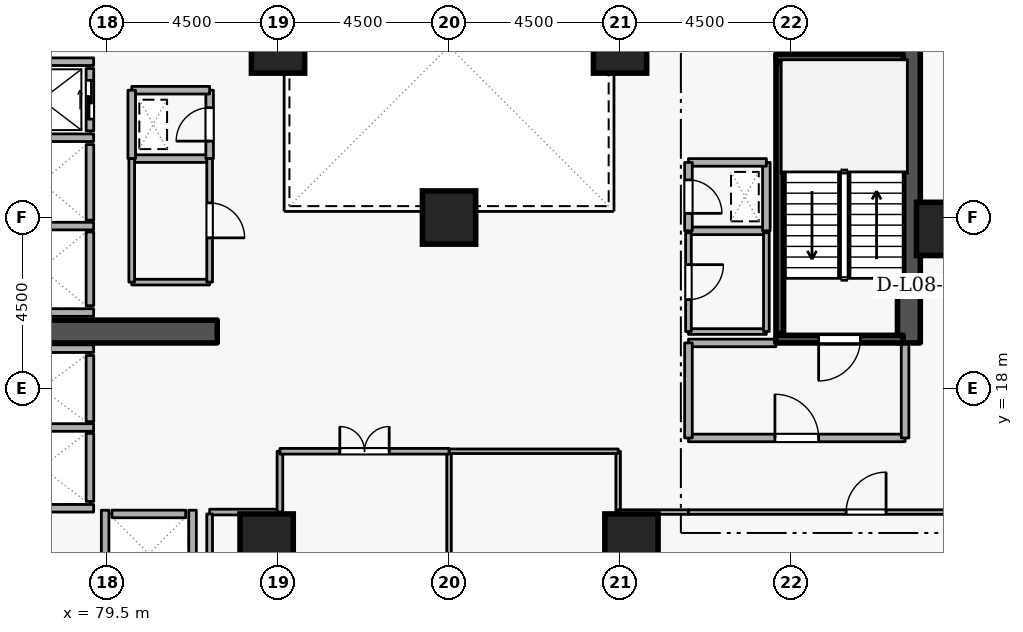
"""IFC4 building model, lengths in metres.
Left out: names, types, materials, properties, quantities, classifications, styles, units other than length and angle.
Written with IfcOpenShell. Run it as: python <this file> out.ifc"""

import sys

from ifc_helpers import new_model, si_unit, direction, frame, frame_2d, origin, origin_2d, place, context, subcontext, project, spatial, rectangle, extrude, element, fill, save


model = new_model("IFC4")
c1 = context("Model", 3, precision=1e-05, world=origin(), true_north=direction((0.0, 1.0)))
c2 = subcontext(c1, "Body", "Model", "MODEL_VIEW")
j1 = project(units=[si_unit("LENGTHUNIT", "METRE"), si_unit("PLANEANGLEUNIT", "RADIAN")], contexts=[c1])
p1 = place(None, origin())
s1 = spatial("IfcSite", under=j1, at=p1, CompositionType="ELEMENT")
p2 = place(p1, origin())
s2 = spatial("IfcBuilding", under=s1, at=p2, CompositionType="ELEMENT")
p3 = place(p2, frame((0.0, 0.0, 35.1)))
s3 = spatial("IfcBuildingStorey", under=s2, at=p3, CompositionType="ELEMENT", Elevation=35.1)
p4 = place(p3, frame((100.6, 19.2, 0.0), z_axis=(0.0, 0.0, 1.0), x_axis=(0.0, 1.0, 0.0)))
e1 = element("IfcWall", 1, at=p4, inside=s3, PredefinedType="SHEAR", context=c2, shape_type="SweptSolid", body=[
    extrude(rectangle(XDim=15.6, YDim=0.6, at=frame_2d((7.8, 0.0))), origin(), (0.0, 0.0, 1.0), 3.6),
])
p5 = place(p3, frame((76.7, 19.5, 0.0), z_axis=(0.0, 0.0, 1.0), x_axis=(1.0, 0.0, 0.0)))
e2 = element("IfcWall", 2, at=p5, inside=s3, PredefinedType="SHEAR", context=c2, shape_type="SweptSolid", body=[
    extrude(rectangle(XDim=5.7, YDim=0.6, at=frame_2d((2.85, 0.0))), origin(), (0.0, 0.0, 1.0), 3.6),
])
for number, where, z_axis, x_axis in (
    (3, (93.3, 14.0, 0.0), (0.0, 0.0, 1.0), (1.0, 0.0, 0.0)),
    (4, (83.7, 14.0, 0.0), (0.0, 0.0, 1.0), (1.0, 0.0, 0.0)),
    (5, (101.5, 22.2, 0.0), (0.0, 0.0, 1.0), (1.0, 0.0, 0.0)),
    (6, (93.0, 27.0, 0.0), (0.0, 0.0, 1.0), (1.0, 0.0, 0.0)),
    (7, (84.0, 27.0, 0.0), (0.0, 0.0, 1.0), (1.0, 0.0, 0.0)),
    (8, (88.5, 22.5, 0.0), (0.0, 0.0, 1.0), (1.0, 0.0, 0.0)),
):
    element("IfcColumn", number, at=place(p3, frame(where, z_axis=z_axis, x_axis=x_axis)), inside=s3, PredefinedType="COLUMN", context=c2, shape_type="SweptSolid", body=[
        extrude(rectangle(XDim=1.4, YDim=1.4, at=origin_2d()), origin(), (0.0, 0.0, 1.0), 3.6),
    ])
p6 = place(p3, frame((79.05, 24.78, 0.0), z_axis=(0.0, 0.0, 1.0), x_axis=(0.0, 1.0, 0.0)))
e9 = element("IfcWall", 9, at=p6, inside=s3, PredefinedType="STANDARD", context=c2, shape_type="SweptSolid", body=[
    extrude(rectangle(XDim=1.64, YDim=0.2, at=frame_2d((0.82, 0.0))), origin(), (0.0, 0.0, 1.0), 3.34),
])
p7 = place(p6, frame((0.31, 0.0, 0.0)))
e10 = element("IfcOpeningElement", 10, at=p7, cuts=e9, PredefinedType="OPENING", context=c2, shape_type="SweptSolid", body=[
    extrude(rectangle(XDim=1.02, YDim=2.06, at=frame_2d((0.51, 1.03))), frame((0.0, 0.11, 0.0), z_axis=(0.0, -1.0, 0.0), x_axis=(1.0, 0.0, 0.0)), (0.0, 0.0, 1.0), 0.22),
])
p8 = place(p3, frame((79.05, 22.43, 0.0), z_axis=(0.0, 0.0, 1.0), x_axis=(0.0, 1.0, 0.0)))
e11 = element("IfcWall", 11, at=p8, inside=s3, PredefinedType="STANDARD", context=c2, shape_type="SweptSolid", body=[
    extrude(rectangle(XDim=1.99, YDim=0.2, at=frame_2d((0.995, 0.0))), origin(), (0.0, 0.0, 1.0), 3.34),
])
p9 = place(p3, frame((79.05, 20.18, 0.0), z_axis=(0.0, 0.0, 1.0), x_axis=(0.0, 1.0, 0.0)))
e12 = element("IfcWall", 12, at=p9, inside=s3, PredefinedType="STANDARD", context=c2, shape_type="SweptSolid", body=[
    extrude(rectangle(XDim=1.94, YDim=0.2, at=frame_2d((0.97, 0.0))), origin(), (0.0, 0.0, 1.0), 3.34),
])
p10 = place(p3, frame((79.05, 17.13, 0.0), z_axis=(0.0, 0.0, 1.0), x_axis=(0.0, 1.0, 0.0)))
e13 = element("IfcWall", 13, at=p10, inside=s3, PredefinedType="STANDARD", context=c2, shape_type="SweptSolid", body=[
    extrude(rectangle(XDim=1.74, YDim=0.2, at=frame_2d((0.87, 0.0))), origin(), (0.0, 0.0, 1.0), 3.34),
])
p11 = place(p3, frame((79.05, 15.03, 0.0), z_axis=(0.0, 0.0, 1.0), x_axis=(0.0, 1.0, 0.0)))
e14 = element("IfcWall", 14, at=p11, inside=s3, PredefinedType="STANDARD", context=c2, shape_type="SweptSolid", body=[
    extrude(rectangle(XDim=1.79, YDim=0.2, at=frame_2d((0.895, 0.0))), origin(), (0.0, 0.0, 1.0), 3.34),
])
p12 = place(p3, frame((79.63, 14.7, 0.0), z_axis=(0.0, 0.0, 1.0), x_axis=(1.0, 0.0, 0.0)))
e15 = element("IfcWall", 15, at=p12, inside=s3, PredefinedType="STANDARD", context=c2, shape_type="SweptSolid", body=[
    extrude(rectangle(XDim=1.94, YDim=0.2, at=frame_2d((0.97, 0.0))), origin(), (0.0, 0.0, 1.0), 3.34),
])
for number, where, z_axis, x_axis in (
    (16, (76.712, 26.6, 0.0), (0.0, 0.0, 1.0), (1.0, 0.0, 0.0)),
    (17, (76.712, 24.6, 0.0), (0.0, 0.0, 1.0), (1.0, 0.0, 0.0)),
    (18, (76.712, 22.275, 0.0), (0.0, 0.0, 1.0), (1.0, 0.0, 0.0)),
    (19, (76.712, 20.0, 0.0), (0.0, 0.0, 1.0), (1.0, 0.0, 0.0)),
):
    element("IfcWall", number, at=place(p3, frame(where, z_axis=z_axis, x_axis=x_axis)), inside=s3, PredefinedType="STANDARD", context=c2, shape_type="SweptSolid", body=[
        extrude(rectangle(XDim=2.436, YDim=0.2, at=frame_2d((1.218, 0.0))), origin(), (0.0, 0.0, 1.0), 3.34),
    ])
p13 = place(p3, frame((76.402, 19.05, 0.0), z_axis=(0.0, 0.0, 1.0), x_axis=(1.0, 0.0, 0.0)))
e20 = element("IfcWall", 20, at=p13, inside=s3, PredefinedType="STANDARD", context=c2, shape_type="SweptSolid", body=[
    extrude(rectangle(XDim=2.746, YDim=0.2, at=frame_2d((1.373, 0.0))), origin(), (0.0, 0.0, 1.0), 2.545),
])
p14 = place(p3, frame((76.402, 16.975, 0.0), z_axis=(0.0, 0.0, 1.0), x_axis=(1.0, 0.0, 0.0)))
e21 = element("IfcWall", 21, at=p14, inside=s3, PredefinedType="STANDARD", context=c2, shape_type="SweptSolid", body=[
    extrude(rectangle(XDim=2.746, YDim=0.2, at=frame_2d((1.373, 0.0))), origin(), (0.0, 0.0, 1.0), 3.34),
])
p15 = place(p3, frame((76.512, 14.85, 0.0), z_axis=(0.0, 0.0, 1.0), x_axis=(1.0, 0.0, 0.0)))
e22 = element("IfcWall", 22, at=p15, inside=s3, PredefinedType="STANDARD", context=c2, shape_type="SweptSolid", body=[
    extrude(rectangle(XDim=2.636, YDim=0.2, at=frame_2d((1.318, 0.0))), origin(), (0.0, 0.0, 1.0), 3.34),
])
for number, where, z_axis, x_axis in (
    (23, (81.75, 12.612, 0.0), (0.0, 0.0, 1.0), (0.0, 1.0, 0.0)),
    (24, (79.45, 12.612, 0.0), (0.0, 0.0, 1.0), (0.0, 1.0, 0.0)),
):
    element("IfcWall", number, at=place(p3, frame(where, z_axis=z_axis, x_axis=x_axis)), inside=s3, PredefinedType="STANDARD", context=c2, shape_type="SweptSolid", body=[
        extrude(rectangle(XDim=2.186, YDim=0.2, at=frame_2d((1.093, 0.0))), origin(), (0.0, 0.0, 1.0), 3.34),
    ])
p16 = place(p3, frame((100.45, 19.3, 0.0), z_axis=(0.0, 0.0, 1.0), x_axis=(-1.0, 0.0, 0.0)))
e25 = element("IfcWall", 25, at=p16, inside=s3, PredefinedType="SHEAR", context=c2, shape_type="SweptSolid", body=[
    extrude(rectangle(XDim=3.35, YDim=0.2, at=frame_2d((1.675, 0.0))), origin(), (0.0, 0.0, 1.0), 3.6),
])
p17 = place(p16, frame((1.125, 0.0, 0.0)))
e26 = element("IfcOpeningElement", 26, at=p17, cuts=e25, PredefinedType="OPENING", context=c2, shape_type="SweptSolid", body=[
    extrude(rectangle(XDim=1.1, YDim=2.1, at=frame_2d((0.55, 1.05))), frame((0.0, 0.11, 0.0), z_axis=(0.0, -1.0, 0.0), x_axis=(1.0, 0.0, 0.0)), (0.0, 0.0, 1.0), 0.22),
])
p18 = place(p3, frame((97.1, 26.7, 0.0), z_axis=(0.0, 0.0, 1.0), x_axis=(1.0, 0.0, 0.0)))
e27 = element("IfcWall", 27, at=p18, inside=s3, PredefinedType="SHEAR", context=c2, shape_type="SweptSolid", body=[
    extrude(rectangle(XDim=3.35, YDim=0.2, at=frame_2d((1.675, 0.0))), origin(), (0.0, 0.0, 1.0), 3.6),
])
p19 = place(p3, frame((97.203, 26.55, 0.0), z_axis=(0.0, 0.0, 1.0), x_axis=(0.0, -1.0, 0.0)))
e28 = element("IfcWall", 28, at=p19, inside=s3, PredefinedType="SHEAR", context=c2, shape_type="SweptSolid", body=[
    extrude(rectangle(XDim=7.1, YDim=0.2, at=frame_2d((3.55, 0.0))), origin(), (0.0, 0.0, 1.0), 3.6),
])
p20 = place(p3, frame((94.8, 16.7, 0.0), z_axis=(0.0, 0.0, 1.0), x_axis=(1.0, 0.0, 0.0)))
e29 = element("IfcWall", 29, at=p20, inside=s3, PredefinedType="STANDARD", context=c2, shape_type="SweptSolid", body=[
    extrude(rectangle(XDim=5.7, YDim=0.2, at=frame_2d((2.85, 0.0))), origin(), (0.0, 0.0, 1.0), 3.34),
])
p21 = place(p20, frame((2.275, 0.0, 0.0)))
e30 = element("IfcOpeningElement", 30, at=p21, cuts=e29, PredefinedType="OPENING", context=c2, shape_type="SweptSolid", body=[
    extrude(rectangle(XDim=1.15, YDim=2.1, at=frame_2d((0.575, 1.05))), frame((0.0, 0.11, 0.0), z_axis=(0.0, -1.0, 0.0), x_axis=(1.0, 0.0, 0.0)), (0.0, 0.0, 1.0), 0.22),
])
p22 = place(p3, frame((100.5, 16.7, 0.0), z_axis=(0.0, 0.0, 1.0), x_axis=(0.0, 1.0, 0.0)))
e31 = element("IfcWall", 31, at=p22, inside=s3, PredefinedType="STANDARD", context=c2, shape_type="SweptSolid", body=[
    extrude(rectangle(XDim=2.5, YDim=0.2, at=frame_2d((1.25, 0.0))), origin(), (0.0, 0.0, 1.0), 3.34),
])
p23 = place(p3, frame((97.1, 19.2, 0.0), z_axis=(0.0, 0.0, 1.0), x_axis=(-1.0, 0.0, 0.0)))
e32 = element("IfcWall", 32, at=p23, inside=s3, PredefinedType="STANDARD", context=c2, shape_type="SweptSolid", body=[
    extrude(rectangle(XDim=2.3, YDim=0.2, at=frame_2d((1.15, 0.0))), origin(), (0.0, 0.0, 1.0), 2.545),
])
p24 = place(p3, frame((94.8, 19.2, 0.0), z_axis=(0.0, 0.0, 1.0), x_axis=(0.0, -1.0, 0.0)))
e33 = element("IfcWall", 33, at=p24, inside=s3, PredefinedType="STANDARD", context=c2, shape_type="SweptSolid", body=[
    extrude(rectangle(XDim=2.5, YDim=0.2, at=frame_2d((1.25, 0.0))), origin(), (0.0, 0.0, 1.0), 3.34),
])
p25 = place(p3, frame((94.8, 22.15, 0.0), z_axis=(0.0, 0.0, 1.0), x_axis=(1.0, 0.0, 0.0)))
e34 = element("IfcWall", 34, at=p25, inside=s3, PredefinedType="STANDARD", context=c2, shape_type="SweptSolid", body=[
    extrude(rectangle(XDim=2.05, YDim=0.2, at=frame_2d((1.025, 0.0))), origin(), (0.0, 0.0, 1.0), 3.34),
])
p26 = place(p3, frame((96.85, 22.15, 0.0), z_axis=(0.0, 0.0, 1.0), x_axis=(0.0, 1.0, 0.0)))
e35 = element("IfcWall", 35, at=p26, inside=s3, PredefinedType="STANDARD", context=c2, shape_type="SweptSolid", body=[
    extrude(rectangle(XDim=1.8, YDim=0.2, at=frame_2d((0.9, 0.0))), origin(), (0.0, 0.0, 1.0), 3.34),
])
p27 = place(p3, frame((96.85, 23.95, 0.0), z_axis=(0.0, 0.0, 1.0), x_axis=(-1.0, 0.0, 0.0)))
e36 = element("IfcWall", 36, at=p27, inside=s3, PredefinedType="STANDARD", context=c2, shape_type="SweptSolid", body=[
    extrude(rectangle(XDim=2.05, YDim=0.2, at=frame_2d((1.025, 0.0))), origin(), (0.0, 0.0, 1.0), 3.34),
])
p28 = place(p3, frame((94.8, 23.95, 0.0), z_axis=(0.0, 0.0, 1.0), x_axis=(0.0, -1.0, 0.0)))
e37 = element("IfcWall", 37, at=p28, inside=s3, PredefinedType="STANDARD", context=c2, shape_type="SweptSolid", body=[
    extrude(rectangle(XDim=1.8, YDim=0.2, at=frame_2d((0.9, 0.0))), origin(), (0.0, 0.0, 1.0), 3.34),
])
p29 = place(p28, frame((0.46, 0.0, 0.0)))
e38 = element("IfcOpeningElement", 38, at=p29, cuts=e37, PredefinedType="OPENING", context=c2, shape_type="SweptSolid", body=[
    extrude(rectangle(XDim=0.88, YDim=2.04, at=frame_2d((0.44, 1.02))), frame((0.0, 0.11, 0.0), z_axis=(0.0, -1.0, 0.0), x_axis=(1.0, 0.0, 0.0)), (0.0, 0.0, 1.0), 0.22),
])
p30 = place(p3, frame((80.15, 24.05, 0.0), z_axis=(0.0, 0.0, 1.0), x_axis=(1.0, 0.0, 0.0)))
e39 = element("IfcWall", 39, at=p30, inside=s3, PredefinedType="STANDARD", context=c2, shape_type="SweptSolid", body=[
    extrude(rectangle(XDim=2.05, YDim=0.2, at=frame_2d((1.025, 0.0))), origin(), (0.0, 0.0, 1.0), 3.34),
])
p31 = place(p3, frame((82.2, 24.05, 0.0), z_axis=(0.0, 0.0, 1.0), x_axis=(0.0, 1.0, 0.0)))
e40 = element("IfcWall", 40, at=p31, inside=s3, PredefinedType="STANDARD", context=c2, shape_type="SweptSolid", body=[
    extrude(rectangle(XDim=1.8, YDim=0.2, at=frame_2d((0.9, 0.0))), origin(), (0.0, 0.0, 1.0), 3.34),
])
p32 = place(p31, frame((0.46, 0.0, 0.0)))
e41 = element("IfcOpeningElement", 41, at=p32, cuts=e40, PredefinedType="OPENING", context=c2, shape_type="SweptSolid", body=[
    extrude(rectangle(XDim=0.88, YDim=2.04, at=frame_2d((0.44, 1.02))), frame((0.0, 0.11, 0.0), z_axis=(0.0, -1.0, 0.0), x_axis=(1.0, 0.0, 0.0)), (0.0, 0.0, 1.0), 0.22),
])
p33 = place(p3, frame((82.2, 25.85, 0.0), z_axis=(0.0, 0.0, 1.0), x_axis=(-1.0, 0.0, 0.0)))
e42 = element("IfcWall", 42, at=p33, inside=s3, PredefinedType="STANDARD", context=c2, shape_type="SweptSolid", body=[
    extrude(rectangle(XDim=2.05, YDim=0.2, at=frame_2d((1.025, 0.0))), origin(), (0.0, 0.0, 1.0), 3.34),
])
p34 = place(p3, frame((80.15, 25.85, 0.0), z_axis=(0.0, 0.0, 1.0), x_axis=(0.0, -1.0, 0.0)))
e43 = element("IfcWall", 43, at=p34, inside=s3, PredefinedType="STANDARD", context=c2, shape_type="SweptSolid", body=[
    extrude(rectangle(XDim=1.8, YDim=0.2, at=frame_2d((0.9, 0.0))), origin(), (0.0, 0.0, 1.0), 3.34),
])
p35 = place(p3, frame((94.8, 19.5, 0.0), z_axis=(0.0, 0.0, 1.0), x_axis=(1.0, 0.0, 0.0)))
e44 = element("IfcWall", 44, at=p35, inside=s3, PredefinedType="PARTITIONING", context=c2, shape_type="SweptSolid", body=[
    extrude(rectangle(XDim=2.05, YDim=0.15, at=frame_2d((1.025, 0.0))), origin(), (0.0, 0.0, 1.0), 2.545),
])
p36 = place(p3, frame((96.85, 19.5, 0.0), z_axis=(0.0, 0.0, 1.0), x_axis=(0.0, 1.0, 0.0)))
e45 = element("IfcWall", 45, at=p36, inside=s3, PredefinedType="PARTITIONING", context=c2, shape_type="SweptSolid", body=[
    extrude(rectangle(XDim=2.6, YDim=0.15, at=frame_2d((1.3, 0.0))), origin(), (0.0, 0.0, 1.0), 3.34),
])
p37 = place(p3, frame((94.8, 22.1, 0.0), z_axis=(0.0, 0.0, 1.0), x_axis=(0.0, -1.0, 0.0)))
e46 = element("IfcWall", 46, at=p37, inside=s3, PredefinedType="PARTITIONING", context=c2, shape_type="SweptSolid", body=[
    extrude(rectangle(XDim=2.6, YDim=0.15, at=frame_2d((1.3, 0.0))), origin(), (0.0, 0.0, 1.0), 3.34),
])
p38 = place(p37, frame((0.84, 0.0, 0.0)))
e47 = element("IfcOpeningElement", 47, at=p38, cuts=e46, PredefinedType="OPENING", context=c2, shape_type="SweptSolid", body=[
    extrude(rectangle(XDim=0.92, YDim=2.08, at=frame_2d((0.46, 1.04))), frame((0.0, 0.085, 0.0), z_axis=(0.0, -1.0, 0.0), x_axis=(1.0, 0.0, 0.0)), (0.0, 0.0, 1.0), 0.17),
])
p39 = place(p3, frame((82.2, 20.8, 0.0), z_axis=(0.0, 0.0, 1.0), x_axis=(-1.0, 0.0, 0.0)))
e48 = element("IfcWall", 48, at=p39, inside=s3, PredefinedType="PARTITIONING", context=c2, shape_type="SweptSolid", body=[
    extrude(rectangle(XDim=2.05, YDim=0.15, at=frame_2d((1.025, 0.0))), origin(), (0.0, 0.0, 1.0), 3.34),
])
p40 = place(p3, frame((80.15, 20.8, 0.0), z_axis=(0.0, 0.0, 1.0), x_axis=(0.0, 1.0, 0.0)))
e49 = element("IfcWall", 49, at=p40, inside=s3, PredefinedType="PARTITIONING", context=c2, shape_type="SweptSolid", body=[
    extrude(rectangle(XDim=3.25, YDim=0.15, at=frame_2d((1.625, 0.0))), origin(), (0.0, 0.0, 1.0), 3.34),
])
p41 = place(p3, frame((82.2, 24.05, 0.0), z_axis=(0.0, 0.0, 1.0), x_axis=(0.0, -1.0, 0.0)))
e50 = element("IfcWall", 50, at=p41, inside=s3, PredefinedType="PARTITIONING", context=c2, shape_type="SweptSolid", body=[
    extrude(rectangle(XDim=3.25, YDim=0.15, at=frame_2d((1.625, 0.0))), origin(), (0.0, 0.0, 1.0), 3.34),
])
p42 = place(p41, frame((1.165, 0.0, 0.0)))
e51 = element("IfcOpeningElement", 51, at=p42, cuts=e50, PredefinedType="OPENING", context=c2, shape_type="SweptSolid", body=[
    extrude(rectangle(XDim=0.92, YDim=2.08, at=frame_2d((0.46, 1.04))), frame((0.0, 0.085, 0.0), z_axis=(0.0, -1.0, 0.0), x_axis=(1.0, 0.0, 0.0)), (0.0, 0.0, 1.0), 0.17),
])
p43 = place(p3, frame((92.95, 16.35, 0.0), z_axis=(0.0, 0.0, 1.0), x_axis=(0.0, -1.0, 0.0)))
e52 = element("IfcWall", 52, at=p43, inside=s3, PredefinedType="PARTITIONING", context=c2, shape_type="SweptSolid", body=[
    extrude(rectangle(XDim=1.6, YDim=0.12, at=frame_2d((0.8, 0.0))), origin(), (0.0, 0.0, 1.0), 3.34),
])
p44 = place(p3, frame((92.95, 14.75, 0.0), z_axis=(0.0, 0.0, 1.0), x_axis=(1.0, 0.0, 0.0)))
e53 = element("IfcWall", 53, at=p44, inside=s3, PredefinedType="PARTITIONING", context=c2, shape_type="SweptSolid", body=[
    extrude(rectangle(XDim=1.85, YDim=0.12, at=frame_2d((0.925, 0.0))), origin(), (0.0, 0.0, 1.0), 3.34),
])
p45 = place(p3, frame((94.8, 14.75, 0.0), z_axis=(0.0, 0.0, 1.0), x_axis=(1.0, 0.0, 0.0)))
e54 = element("IfcWall", 54, at=p45, inside=s3, PredefinedType="PARTITIONING", context=c2, shape_type="SweptSolid", body=[
    extrude(rectangle(XDim=9.35, YDim=0.12, at=frame_2d((4.675, 0.0))), origin(), (0.0, 0.0, 1.0), 3.34),
])
p46 = place(p45, frame((4.15, 0.0, 0.0)))
e55 = element("IfcOpeningElement", 55, at=p46, cuts=e54, PredefinedType="OPENING", context=c2, shape_type="SweptSolid", body=[
    extrude(rectangle(XDim=1.05, YDim=2.1, at=frame_2d((0.525, 1.05))), frame((0.0, 0.07, 0.0), z_axis=(0.0, -1.0, 0.0), x_axis=(1.0, 0.0, 0.0)), (0.0, 0.0, 1.0), 0.14),
])
p47 = place(p3, frame((88.5, 2.78, 0.0), z_axis=(0.0, 0.0, 1.0), x_axis=(0.0, 1.0, 0.0)))
e56 = element("IfcWall", 56, at=p47, inside=s3, PredefinedType="PARTITIONING", context=c2, shape_type="SweptSolid", body=[
    extrude(rectangle(XDim=13.57, YDim=0.12, at=frame_2d((6.785, 0.0))), origin(), (0.0, 0.0, 1.0), 2.878),
])
p48 = place(p3, frame((88.5, 16.35, 0.0), z_axis=(0.0, 0.0, 1.0), x_axis=(1.0, 0.0, 0.0)))
e57 = element("IfcWall", 57, at=p48, inside=s3, PredefinedType="PARTITIONING", context=c2, shape_type="SweptSolid", body=[
    extrude(rectangle(XDim=4.45, YDim=0.12, at=frame_2d((2.225, 0.0))), origin(), (0.0, 0.0, 1.0), 3.34),
])
p49 = place(p3, frame((82.2, 14.75, 0.0), z_axis=(0.0, 0.0, 1.0), x_axis=(1.0, 0.0, 0.0)))
e58 = element("IfcWall", 58, at=p49, inside=s3, PredefinedType="PARTITIONING", context=c2, shape_type="SweptSolid", body=[
    extrude(rectangle(XDim=1.85, YDim=0.15, at=frame_2d((0.925, 0.0))), origin(), (0.0, 0.0, 1.0), 3.34),
])
p50 = place(p3, frame((84.05, 14.75, 0.0), z_axis=(0.0, 0.0, 1.0), x_axis=(0.0, 1.0, 0.0)))
e59 = element("IfcWall", 59, at=p50, inside=s3, PredefinedType="PARTITIONING", context=c2, shape_type="SweptSolid", body=[
    extrude(rectangle(XDim=1.6, YDim=0.15, at=frame_2d((0.8, 0.0))), origin(), (0.0, 0.0, 1.0), 3.34),
])
p51 = place(p3, frame((84.05, 16.35, 0.0), z_axis=(0.0, 0.0, 1.0), x_axis=(1.0, 0.0, 0.0)))
e60 = element("IfcWall", 60, at=p51, inside=s3, PredefinedType="PARTITIONING", context=c2, shape_type="SweptSolid", body=[
    extrude(rectangle(XDim=4.45, YDim=0.15, at=frame_2d((2.225, 0.0))), origin(), (0.0, 0.0, 1.0), 3.34),
])
p52 = place(p51, frame((1.575, 0.0, 0.0)))
e61 = element("IfcOpeningElement", 61, at=p52, cuts=e60, PredefinedType="OPENING", context=c2, shape_type="SweptSolid", body=[
    extrude(rectangle(XDim=1.3, YDim=2.12, at=frame_2d((0.65, 1.06))), frame((0.0, 0.085, 0.0), z_axis=(0.0, -1.0, 0.0), x_axis=(1.0, 0.0, 0.0)), (0.0, 0.0, 1.0), 0.17),
])
p53 = place(p3, frame((82.2, 12.4, 0.0), z_axis=(0.0, 0.0, 1.0), x_axis=(0.0, 1.0, 0.0)))
e62 = element("IfcWall", 62, at=p53, inside=s3, PredefinedType="PARTITIONING", context=c2, shape_type="SweptSolid", body=[
    extrude(rectangle(XDim=2.3, YDim=0.15, at=frame_2d((1.15, 0.0))), origin(), (0.0, 0.0, 1.0), 3.34),
])
p54 = place(p7, origin())
e63 = element("IfcDoor", 63, at=p54, inside=s3, OperationType="SLIDING_TO_LEFT", PredefinedType="DOOR", context=c2, shape_type="SweptSolid", body=[
    extrude(rectangle(XDim=1.02, YDim=2.06, at=frame_2d((0.51, 1.03))), frame((0.0, 0.025, 0.0), z_axis=(0.0, -1.0, 0.0), x_axis=(1.0, 0.0, 0.0)), (0.0, 0.0, 1.0), 0.05),
])
fill(e10, e63)
p55 = place(p17, origin())
e64 = element("IfcDoor", 64, at=p55, inside=s3, OperationType="SINGLE_SWING_RIGHT", PredefinedType="DOOR", context=c2, shape_type="SweptSolid", body=[
    extrude(rectangle(XDim=1.1, YDim=2.1, at=frame_2d((0.55, 1.05))), frame((0.0, 0.025, 0.0), z_axis=(0.0, -1.0, 0.0), x_axis=(1.0, 0.0, 0.0)), (0.0, 0.0, 1.0), 0.05),
])
fill(e26, e64)
p56 = place(p21, origin())
e65 = element("IfcDoor", 65, at=p56, inside=s3, OperationType="SINGLE_SWING_LEFT", PredefinedType="DOOR", context=c2, shape_type="SweptSolid", body=[
    extrude(rectangle(XDim=1.15, YDim=2.1, at=frame_2d((0.575, 1.05))), frame((0.0, 0.025, 0.0), z_axis=(0.0, -1.0, 0.0), x_axis=(1.0, 0.0, 0.0)), (0.0, 0.0, 1.0), 0.05),
])
fill(e30, e65)
p57 = place(p29, origin())
e66 = element("IfcDoor", 66, at=p57, inside=s3, OperationType="SINGLE_SWING_RIGHT", PredefinedType="DOOR", context=c2, shape_type="SweptSolid", body=[
    extrude(rectangle(XDim=0.88, YDim=2.04, at=frame_2d((0.44, 1.02))), frame((0.0, 0.025, 0.0), z_axis=(0.0, -1.0, 0.0), x_axis=(1.0, 0.0, 0.0)), (0.0, 0.0, 1.0), 0.05),
])
fill(e38, e66)
p58 = place(p32, origin())
e67 = element("IfcDoor", 67, at=p58, inside=s3, OperationType="SINGLE_SWING_LEFT", PredefinedType="DOOR", context=c2, shape_type="SweptSolid", body=[
    extrude(rectangle(XDim=0.88, YDim=2.04, at=frame_2d((0.44, 1.02))), frame((0.0, 0.025, 0.0), z_axis=(0.0, -1.0, 0.0), x_axis=(1.0, 0.0, 0.0)), (0.0, 0.0, 1.0), 0.05),
])
fill(e41, e67)
p59 = place(p38, origin())
e68 = element("IfcDoor", 68, at=p59, inside=s3, OperationType="SINGLE_SWING_LEFT", PredefinedType="DOOR", context=c2, shape_type="SweptSolid", body=[
    extrude(rectangle(XDim=0.92, YDim=2.08, at=frame_2d((0.46, 1.04))), frame((0.0, 0.025, 0.0), z_axis=(0.0, -1.0, 0.0), x_axis=(1.0, 0.0, 0.0)), (0.0, 0.0, 1.0), 0.05),
])
fill(e47, e68)
p60 = place(p42, origin())
e69 = element("IfcDoor", 69, at=p60, inside=s3, OperationType="SINGLE_SWING_RIGHT", PredefinedType="DOOR", context=c2, shape_type="SweptSolid", body=[
    extrude(rectangle(XDim=0.92, YDim=2.08, at=frame_2d((0.46, 1.04))), frame((0.0, 0.025, 0.0), z_axis=(0.0, -1.0, 0.0), x_axis=(1.0, 0.0, 0.0)), (0.0, 0.0, 1.0), 0.05),
])
fill(e51, e69)
p61 = place(p46, origin())
e70 = element("IfcDoor", 70, at=p61, inside=s3, OperationType="SINGLE_SWING_RIGHT", PredefinedType="DOOR", context=c2, shape_type="SweptSolid", body=[
    extrude(rectangle(XDim=1.05, YDim=2.1, at=frame_2d((0.525, 1.05))), frame((0.0, 0.025, 0.0), z_axis=(0.0, -1.0, 0.0), x_axis=(1.0, 0.0, 0.0)), (0.0, 0.0, 1.0), 0.05),
])
fill(e55, e70)
p62 = place(p52, origin())
e71 = element("IfcDoor", 71, at=p62, inside=s3, OperationType="DOUBLE_DOOR_SINGLE_SWING", PredefinedType="DOOR", context=c2, shape_type="SweptSolid", body=[
    extrude(rectangle(XDim=1.3, YDim=2.12, at=frame_2d((0.65, 1.06))), frame((0.0, 0.025, 0.0), z_axis=(0.0, -1.0, 0.0), x_axis=(1.0, 0.0, 0.0)), (0.0, 0.0, 1.0), 0.05),
])
fill(e61, e71)
save(model, sys.argv[1])
